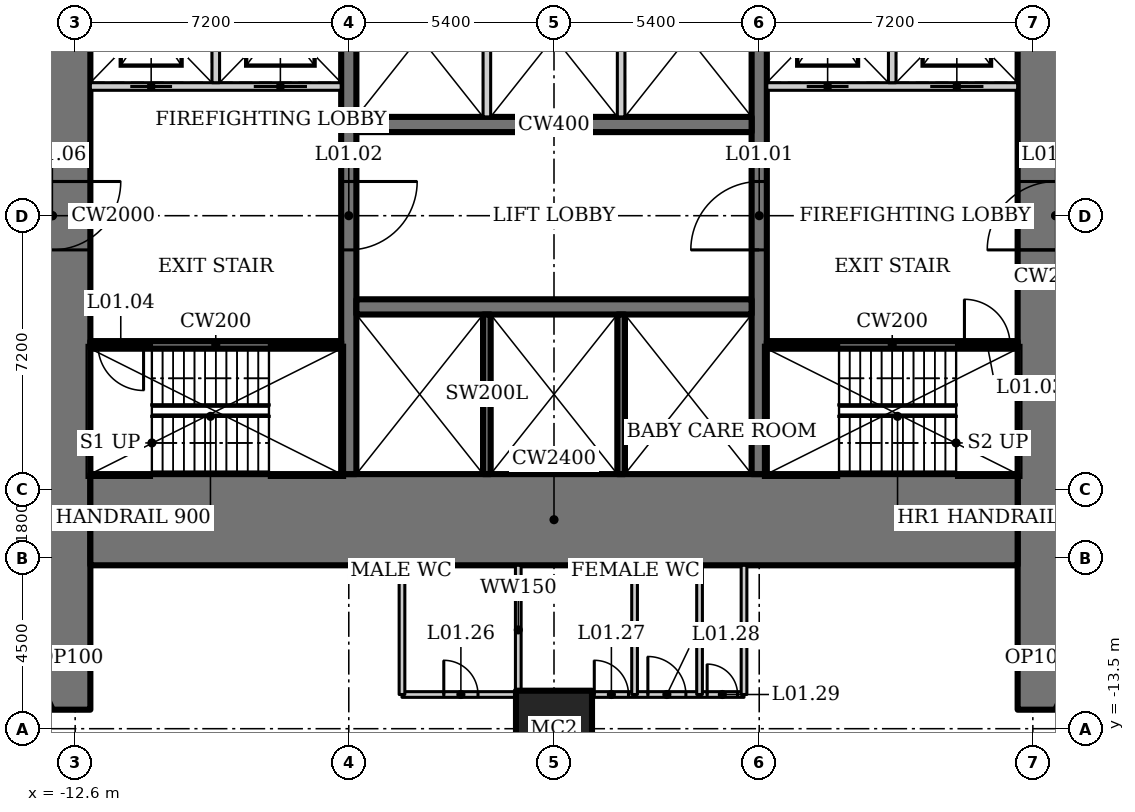
"""IFC4 building model, lengths in metres.
Left out: names, types, materials, properties, quantities, classifications, styles, units other than length and angle.
Written with IfcOpenShell. Run it as: python <this file> out.ifc"""

import sys

from ifc_helpers import new_model, si_unit, direction, frame, frame_2d, origin, origin_2d, place, context, subcontext, project, spatial, rectangle, hollow_rectangle, extrude, element, fill, save


model = new_model("IFC4")
c1 = context("Model", 3, precision=1e-05, world=origin(), true_north=direction((0.0, 1.0)))
c2 = subcontext(c1, "Body", "Model", "MODEL_VIEW")
j1 = project(units=[si_unit("LENGTHUNIT", "METRE"), si_unit("PLANEANGLEUNIT", "RADIAN")], contexts=[c1])
p1 = place(None, origin())
s1 = spatial("IfcSite", under=j1, at=p1, CompositionType="ELEMENT")
p2 = place(p1, origin())
s2 = spatial("IfcBuilding", under=s1, at=p2, CompositionType="ELEMENT")
p3 = place(p2, frame((0.0, 0.0, 6.5)))
s3 = spatial("IfcBuildingStorey", under=s2, at=p3, CompositionType="ELEMENT", Elevation=6.5)
p4 = place(p3, frame((0.0, -13.5, 0.0), z_axis=(0.0, 0.0, 1.0), x_axis=(1.0, 0.0, 0.0)))
e1 = element("IfcColumn", 1, at=p4, inside=s3, PredefinedType="COLUMN", context=c2, shape_type="SweptSolid", body=[
    extrude(hollow_rectangle(XDim=2.0, YDim=2.0, WallThickness=0.17, at=origin_2d()), origin(), (0.0, 0.0, 1.0), 8.0),
])
p5 = place(p3, frame((13.2, -13.0, 0.0), z_axis=(0.0, 0.0, 1.0), x_axis=(0.0, 1.0, 0.0)))
e2 = element("IfcWall", 2, at=p5, inside=s3, PredefinedType="SHEAR", context=c2, shape_type="SweptSolid", body=[
    extrude(rectangle(XDim=26.0, YDim=2.0, at=frame_2d((13.0, 0.0))), origin(), (0.0, 0.0, 1.0), 8.0),
])
p6 = place(p5, frame((12.1, 0.0, 0.0)))
e3 = element("IfcOpeningElement", 3, at=p6, cuts=e2, PredefinedType="OPENING", context=c2, shape_type="SweptSolid", body=[
    extrude(rectangle(XDim=1.8, YDim=2.1, at=frame_2d((0.9, 1.05))), frame((0.0, 1.01, 0.0), z_axis=(0.0, -1.0, 0.0), x_axis=(1.0, 0.0, 0.0)), (0.0, 0.0, 1.0), 2.02),
])
p7 = place(p3, frame((-13.2, 13.0, 0.0), z_axis=(0.0, 0.0, 1.0), x_axis=(0.0, -1.0, 0.0)))
e4 = element("IfcWall", 4, at=p7, inside=s3, PredefinedType="SHEAR", context=c2, shape_type="SweptSolid", body=[
    extrude(rectangle(XDim=26.0, YDim=2.0, at=frame_2d((13.0, 0.0))), origin(), (0.0, 0.0, 1.0), 8.0),
])
p8 = place(p7, frame((12.1, 0.0, 0.0)))
e5 = element("IfcOpeningElement", 5, at=p8, cuts=e4, PredefinedType="OPENING", context=c2, shape_type="SweptSolid", body=[
    extrude(rectangle(XDim=1.8, YDim=2.1, at=frame_2d((0.9, 1.05))), frame((0.0, 1.01, 0.0), z_axis=(0.0, -1.0, 0.0), x_axis=(1.0, 0.0, 0.0)), (0.0, 0.0, 1.0), 2.02),
])
p9 = place(p3, frame((-12.2, -8.0, 0.0), z_axis=(0.0, 0.0, 1.0), x_axis=(1.0, 0.0, 0.0)))
e6 = element("IfcWall", 6, at=p9, inside=s3, PredefinedType="SHEAR", context=c2, shape_type="SweptSolid", body=[
    extrude(rectangle(XDim=24.4, YDim=2.4, at=frame_2d((12.2, 0.0))), origin(), (0.0, 0.0, 1.0), 8.0),
])
p10 = place(p3, frame((5.4, -6.8, 0.0), z_axis=(0.0, 0.0, 1.0), x_axis=(0.0, 1.0, 0.0)))
e7 = element("IfcWall", 7, at=p10, inside=s3, PredefinedType="SHEAR", context=c2, shape_type="SweptSolid", body=[
    extrude(rectangle(XDim=13.6, YDim=0.4, at=frame_2d((6.8, 0.0))), origin(), (0.0, 0.0, 1.0), 8.0),
])
p11 = place(p10, frame((5.9, 0.0, 0.0)))
e8 = element("IfcOpeningElement", 8, at=p11, cuts=e7, PredefinedType="OPENING", context=c2, shape_type="SweptSolid", body=[
    extrude(rectangle(XDim=1.8, YDim=2.1, at=frame_2d((0.9, 1.05))), frame((0.0, 0.21, 0.0), z_axis=(0.0, -1.0, 0.0), x_axis=(1.0, 0.0, 0.0)), (0.0, 0.0, 1.0), 0.42),
])
p12 = place(p3, frame((-5.4, 6.8, 0.0), z_axis=(0.0, 0.0, 1.0), x_axis=(0.0, -1.0, 0.0)))
e9 = element("IfcWall", 9, at=p12, inside=s3, PredefinedType="SHEAR", context=c2, shape_type="SweptSolid", body=[
    extrude(rectangle(XDim=13.6, YDim=0.4, at=frame_2d((6.8, 0.0))), origin(), (0.0, 0.0, 1.0), 8.0),
])
p13 = place(p12, frame((5.9, 0.0, 0.0)))
e10 = element("IfcOpeningElement", 10, at=p13, cuts=e9, PredefinedType="OPENING", context=c2, shape_type="SweptSolid", body=[
    extrude(rectangle(XDim=1.8, YDim=2.1, at=frame_2d((0.9, 1.05))), frame((0.0, 0.21, 0.0), z_axis=(0.0, -1.0, 0.0), x_axis=(1.0, 0.0, 0.0)), (0.0, 0.0, 1.0), 0.42),
])
p14 = place(p3, frame((-5.2, -2.4, 0.0), z_axis=(0.0, 0.0, 1.0), x_axis=(1.0, 0.0, 0.0)))
e11 = element("IfcWall", 11, at=p14, inside=s3, PredefinedType="SHEAR", context=c2, shape_type="SweptSolid", body=[
    extrude(rectangle(XDim=10.4, YDim=0.4, at=frame_2d((5.2, 0.0))), origin(), (0.0, 0.0, 1.0), 8.0),
])
for number, where, z_axis, x_axis in (
    (12, (-1.767, -2.6, 0.0), (0.0, 0.0, 1.0), (0.0, -1.0, 0.0)),
    (13, (1.767, -2.6, 0.0), (0.0, 0.0, 1.0), (0.0, -1.0, 0.0)),
):
    element("IfcWall", number, at=place(p3, frame(where, z_axis=z_axis, x_axis=x_axis)), inside=s3, PredefinedType="SOLIDWALL", context=c2, shape_type="SweptSolid", body=[
        extrude(rectangle(XDim=4.2, YDim=0.2, at=frame_2d((2.1, 0.0))), origin(), (0.0, 0.0, 1.0), 8.0),
    ])
p15 = place(p3, frame((5.2, 2.4, 0.0), z_axis=(0.0, 0.0, 1.0), x_axis=(-1.0, 0.0, 0.0)))
e14 = element("IfcWall", 14, at=p15, inside=s3, PredefinedType="SHEAR", context=c2, shape_type="SweptSolid", body=[
    extrude(rectangle(XDim=10.4, YDim=0.4, at=frame_2d((5.2, 0.0))), origin(), (0.0, 0.0, 1.0), 8.0),
])
for number, where, z_axis, x_axis in (
    (15, (-1.767, 2.6, 0.0), (0.0, 0.0, 1.0), (0.0, 1.0, 0.0)),
    (16, (1.767, 2.6, 0.0), (0.0, 0.0, 1.0), (0.0, 1.0, 0.0)),
):
    element("IfcWall", number, at=place(p3, frame(where, z_axis=z_axis, x_axis=x_axis)), inside=s3, PredefinedType="SOLIDWALL", context=c2, shape_type="SweptSolid", body=[
        extrude(rectangle(XDim=4.2, YDim=0.2, at=frame_2d((2.1, 0.0))), origin(), (0.0, 0.0, 1.0), 8.0),
    ])
p16 = place(p3, frame((5.6, -3.4, 0.0), z_axis=(0.0, 0.0, 1.0), x_axis=(1.0, 0.0, 0.0)))
e17 = element("IfcWall", 17, at=p16, inside=s3, PredefinedType="SHEAR", context=c2, shape_type="SweptSolid", body=[
    extrude(rectangle(XDim=6.6, YDim=0.2, at=frame_2d((3.3, 0.0))), origin(), (0.0, 0.0, 1.0), 8.0),
])
p17 = place(p16, frame((5.2, 0.0, 0.0)))
e18 = element("IfcOpeningElement", 18, at=p17, cuts=e17, PredefinedType="OPENING", context=c2, shape_type="SweptSolid", body=[
    extrude(rectangle(XDim=1.2, YDim=2.1, at=frame_2d((0.6, 1.05))), frame((0.0, 0.11, 0.0), z_axis=(0.0, -1.0, 0.0), x_axis=(1.0, 0.0, 0.0)), (0.0, 0.0, 1.0), 0.22),
])
p18 = place(p3, frame((12.2, 3.4, 0.0), z_axis=(0.0, 0.0, 1.0), x_axis=(-1.0, 0.0, 0.0)))
e19 = element("IfcWall", 19, at=p18, inside=s3, PredefinedType="SOLIDWALL", context=c2, shape_type="SweptSolid", body=[
    extrude(rectangle(XDim=6.6, YDim=0.2, at=frame_2d((3.3, 0.0))), origin(), (0.0, 0.0, 1.0), 8.0),
])
p19 = place(p18, frame((4.45, 0.0, 0.0)))
e20 = element("IfcOpeningElement", 20, at=p19, cuts=e19, PredefinedType="OPENING", context=c2, shape_type="SweptSolid", body=[
    extrude(rectangle(XDim=1.1, YDim=2.2, at=frame_2d((0.55, 1.1))), frame((0.0, 0.11, 0.0), z_axis=(0.0, -1.0, 0.0), x_axis=(1.0, 0.0, 0.0)), (0.0, 0.0, 1.0), 0.22),
])
p20 = place(p18, frame((0.9, 0.0, 0.0)))
e21 = element("IfcOpeningElement", 21, at=p20, cuts=e19, PredefinedType="OPENING", context=c2, shape_type="SweptSolid", body=[
    extrude(rectangle(XDim=1.4, YDim=2.2, at=frame_2d((0.7, 1.1))), frame((0.0, 0.11, 0.0), z_axis=(0.0, -1.0, 0.0), x_axis=(1.0, 0.0, 0.0)), (0.0, 0.0, 1.0), 0.22),
])
p21 = place(p3, frame((8.9, 3.5, 0.0), z_axis=(0.0, 0.0, 1.0), x_axis=(0.0, 1.0, 0.0)))
e22 = element("IfcWall", 22, at=p21, inside=s3, PredefinedType="SOLIDWALL", context=c2, shape_type="SweptSolid", body=[
    extrude(rectangle(XDim=3.3, YDim=0.2, at=frame_2d((1.65, 0.0))), origin(), (0.0, 0.0, 1.0), 8.0),
])
p22 = place(p3, frame((-5.6, -3.4, 0.0), z_axis=(0.0, 0.0, 1.0), x_axis=(-1.0, 0.0, 0.0)))
e23 = element("IfcWall", 23, at=p22, inside=s3, PredefinedType="SHEAR", context=c2, shape_type="SweptSolid", body=[
    extrude(rectangle(XDim=6.6, YDim=0.2, at=frame_2d((3.3, 0.0))), origin(), (0.0, 0.0, 1.0), 8.0),
])
p23 = place(p22, frame((5.2, 0.0, 0.0)))
e24 = element("IfcOpeningElement", 24, at=p23, cuts=e23, PredefinedType="OPENING", context=c2, shape_type="SweptSolid", body=[
    extrude(rectangle(XDim=1.2, YDim=2.1, at=frame_2d((0.6, 1.05))), frame((0.0, 0.11, 0.0), z_axis=(0.0, -1.0, 0.0), x_axis=(1.0, 0.0, 0.0)), (0.0, 0.0, 1.0), 0.22),
])
p24 = place(p3, frame((-12.2, 3.4, 0.0), z_axis=(0.0, 0.0, 1.0), x_axis=(1.0, 0.0, 0.0)))
e25 = element("IfcWall", 25, at=p24, inside=s3, PredefinedType="SOLIDWALL", context=c2, shape_type="SweptSolid", body=[
    extrude(rectangle(XDim=6.6, YDim=0.2, at=frame_2d((3.3, 0.0))), origin(), (0.0, 0.0, 1.0), 8.0),
])
p25 = place(p24, frame((1.05, 0.0, 0.0)))
e26 = element("IfcOpeningElement", 26, at=p25, cuts=e25, PredefinedType="OPENING", context=c2, shape_type="SweptSolid", body=[
    extrude(rectangle(XDim=1.1, YDim=2.2, at=frame_2d((0.55, 1.1))), frame((0.0, 0.11, 0.0), z_axis=(0.0, -1.0, 0.0), x_axis=(1.0, 0.0, 0.0)), (0.0, 0.0, 1.0), 0.22),
])
p26 = place(p24, frame((4.3, 0.0, 0.0)))
e27 = element("IfcOpeningElement", 27, at=p26, cuts=e25, PredefinedType="OPENING", context=c2, shape_type="SweptSolid", body=[
    extrude(rectangle(XDim=1.4, YDim=2.2, at=frame_2d((0.7, 1.1))), frame((0.0, 0.11, 0.0), z_axis=(0.0, -1.0, 0.0), x_axis=(1.0, 0.0, 0.0)), (0.0, 0.0, 1.0), 0.22),
])
p27 = place(p3, frame((-8.9, 3.5, 0.0), z_axis=(0.0, 0.0, 1.0), x_axis=(0.0, 1.0, 0.0)))
e28 = element("IfcWall", 28, at=p27, inside=s3, PredefinedType="SOLIDWALL", context=c2, shape_type="SweptSolid", body=[
    extrude(rectangle(XDim=3.3, YDim=0.2, at=frame_2d((1.65, 0.0))), origin(), (0.0, 0.0, 1.0), 8.0),
])
p28 = place(p3, frame((-4.0, -12.6, 0.0), z_axis=(0.0, 0.0, 1.0), x_axis=(1.0, 0.0, 0.0)))
e29 = element("IfcWall", 29, at=p28, inside=s3, PredefinedType="SOLIDWALL", context=c2, shape_type="SweptSolid", body=[
    extrude(rectangle(XDim=9.0, YDim=0.15, at=frame_2d((4.5, 0.0))), origin(), (0.0, 0.0, 1.0), 7.8),
])
p29 = place(p28, frame((1.1, 0.0, 0.0)))
e30 = element("IfcOpeningElement", 30, at=p29, cuts=e29, PredefinedType="OPENING", context=c2, shape_type="SweptSolid", body=[
    extrude(rectangle(XDim=0.9, YDim=2.1, at=frame_2d((0.45, 1.05))), frame((0.0, 0.085, 0.0), z_axis=(0.0, -1.0, 0.0), x_axis=(1.0, 0.0, 0.0)), (0.0, 0.0, 1.0), 0.17),
])
p30 = place(p28, frame((5.06, 0.0, 0.0)))
e31 = element("IfcOpeningElement", 31, at=p30, cuts=e29, PredefinedType="OPENING", context=c2, shape_type="SweptSolid", body=[
    extrude(rectangle(XDim=0.9, YDim=2.1, at=frame_2d((0.45, 1.05))), frame((0.0, 0.085, 0.0), z_axis=(0.0, -1.0, 0.0), x_axis=(1.0, 0.0, 0.0)), (0.0, 0.0, 1.0), 0.17),
])
p31 = place(p28, frame((6.47, 0.0, 0.0)))
e32 = element("IfcOpeningElement", 32, at=p31, cuts=e29, PredefinedType="OPENING", context=c2, shape_type="SweptSolid", body=[
    extrude(rectangle(XDim=1.0, YDim=2.1, at=frame_2d((0.5, 1.05))), frame((0.0, 0.085, 0.0), z_axis=(0.0, -1.0, 0.0), x_axis=(1.0, 0.0, 0.0)), (0.0, 0.0, 1.0), 0.17),
])
p32 = place(p28, frame((8.03, 0.0, 0.0)))
e33 = element("IfcOpeningElement", 33, at=p32, cuts=e29, PredefinedType="OPENING", context=c2, shape_type="SweptSolid", body=[
    extrude(rectangle(XDim=0.8, YDim=2.1, at=frame_2d((0.4, 1.05))), frame((0.0, 0.085, 0.0), z_axis=(0.0, -1.0, 0.0), x_axis=(1.0, 0.0, 0.0)), (0.0, 0.0, 1.0), 0.17),
])
for number, where, z_axis, x_axis in (
    (34, (-4.0, -9.2, 0.0), (0.0, 0.0, 1.0), (0.0, -1.0, 0.0)),
    (35, (5.0, -9.2, 0.0), (0.0, 0.0, 1.0), (0.0, -1.0, 0.0)),
    (36, (-0.94, -9.2, 0.0), (0.0, 0.0, 1.0), (0.0, -1.0, 0.0)),
):
    element("IfcWall", number, at=place(p3, frame(where, z_axis=z_axis, x_axis=x_axis)), inside=s3, PredefinedType="SOLIDWALL", context=c2, shape_type="SweptSolid", body=[
        extrude(rectangle(XDim=3.4, YDim=0.15, at=frame_2d((1.7, 0.0))), origin(), (0.0, 0.0, 1.0), 7.8),
    ])
p33 = place(p3, frame((2.12, -9.2, 0.0), z_axis=(0.0, 0.0, 1.0), x_axis=(0.0, -1.0, 0.0)))
e37 = element("IfcWall", 37, at=p33, inside=s3, PredefinedType="SOLIDWALL", context=c2, shape_type="SweptSolid", body=[
    extrude(rectangle(XDim=3.4, YDim=0.15, at=frame_2d((1.7, 0.0))), origin(), (0.0, 0.0, 1.0), 7.03),
])
p34 = place(p3, frame((3.83, -9.2, 0.0), z_axis=(0.0, 0.0, 1.0), x_axis=(0.0, -1.0, 0.0)))
e38 = element("IfcWall", 38, at=p34, inside=s3, PredefinedType="SOLIDWALL", context=c2, shape_type="SweptSolid", body=[
    extrude(rectangle(XDim=3.4, YDim=0.15, at=frame_2d((1.7, 0.0))), origin(), (0.0, 0.0, 1.0), 7.8),
])
for number, where, z_axis, x_axis in (
    (39, (13.2, -13.0, 0.0), (0.0, 0.0, 1.0), (0.42, 0.907, 0.0)),
    (40, (-13.2, -13.0, 0.0), (0.0, 0.0, 1.0), (-0.42, 0.907, 0.0)),
):
    element("IfcWall", number, at=place(p3, frame(where, z_axis=z_axis, x_axis=x_axis)), inside=s3, PredefinedType="PARTITIONING", context=c2, shape_type="SweptSolid", body=[
        extrude(rectangle(XDim=2.975, YDim=0.1, at=frame_2d((1.488, 0.0))), origin(), (0.0, 0.0, 1.0), 7.8),
    ])
p35 = place(p11, origin())
e41 = element("IfcDoor", 41, at=p35, inside=s3, OperationType="DOUBLE_DOOR_DOUBLE_SWING", PredefinedType="DOOR", context=c2, shape_type="SweptSolid", body=[
    extrude(rectangle(XDim=1.8, YDim=2.1, at=frame_2d((0.9, 1.05))), frame((0.0, 0.025, 0.0), z_axis=(0.0, -1.0, 0.0), x_axis=(1.0, 0.0, 0.0)), (0.0, 0.0, 1.0), 0.05),
])
fill(e8, e41)
p36 = place(p13, origin())
e42 = element("IfcDoor", 42, at=p36, inside=s3, OperationType="DOUBLE_DOOR_DOUBLE_SWING", PredefinedType="DOOR", context=c2, shape_type="SweptSolid", body=[
    extrude(rectangle(XDim=1.8, YDim=2.1, at=frame_2d((0.9, 1.05))), frame((0.0, 0.025, 0.0), z_axis=(0.0, -1.0, 0.0), x_axis=(1.0, 0.0, 0.0)), (0.0, 0.0, 1.0), 0.05),
])
fill(e10, e42)
p37 = place(p17, origin())
e43 = element("IfcDoor", 43, at=p37, inside=s3, OperationType="SINGLE_SWING_RIGHT", PredefinedType="DOOR", context=c2, shape_type="SweptSolid", body=[
    extrude(rectangle(XDim=1.2, YDim=2.1, at=frame_2d((0.6, 1.05))), frame((0.0, 0.025, 0.0), z_axis=(0.0, -1.0, 0.0), x_axis=(1.0, 0.0, 0.0)), (0.0, 0.0, 1.0), 0.05),
])
fill(e18, e43)
p38 = place(p23, origin())
e44 = element("IfcDoor", 44, at=p38, inside=s3, OperationType="SINGLE_SWING_RIGHT", PredefinedType="DOOR", context=c2, shape_type="SweptSolid", body=[
    extrude(rectangle(XDim=1.2, YDim=2.1, at=frame_2d((0.6, 1.05))), frame((0.0, 0.025, 0.0), z_axis=(0.0, -1.0, 0.0), x_axis=(1.0, 0.0, 0.0)), (0.0, 0.0, 1.0), 0.05),
])
fill(e24, e44)
p39 = place(p6, origin())
e45 = element("IfcDoor", 45, at=p39, inside=s3, OperationType="DOUBLE_DOOR_DOUBLE_SWING", PredefinedType="DOOR", context=c2, shape_type="SweptSolid", body=[
    extrude(rectangle(XDim=1.8, YDim=2.1, at=frame_2d((0.9, 1.05))), frame((0.0, 0.025, 0.0), z_axis=(0.0, -1.0, 0.0), x_axis=(1.0, 0.0, 0.0)), (0.0, 0.0, 1.0), 0.05),
])
fill(e3, e45)
p40 = place(p8, origin())
e46 = element("IfcDoor", 46, at=p40, inside=s3, OperationType="DOUBLE_DOOR_DOUBLE_SWING", PredefinedType="DOOR", context=c2, shape_type="SweptSolid", body=[
    extrude(rectangle(XDim=1.8, YDim=2.1, at=frame_2d((0.9, 1.05))), frame((0.0, 0.025, 0.0), z_axis=(0.0, -1.0, 0.0), x_axis=(1.0, 0.0, 0.0)), (0.0, 0.0, 1.0), 0.05),
])
fill(e5, e46)
p41 = place(p25, origin())
e47 = element("IfcDoor", 47, at=p41, inside=s3, OperationType="DOUBLE_DOOR_SLIDING", PredefinedType="DOOR", context=c2, shape_type="SweptSolid", body=[
    extrude(rectangle(XDim=1.1, YDim=2.2, at=frame_2d((0.55, 1.1))), frame((0.0, 0.025, 0.0), z_axis=(0.0, -1.0, 0.0), x_axis=(1.0, 0.0, 0.0)), (0.0, 0.0, 1.0), 0.05),
])
fill(e26, e47)
p42 = place(p26, origin())
e48 = element("IfcDoor", 48, at=p42, inside=s3, OperationType="DOUBLE_DOOR_SLIDING", PredefinedType="DOOR", context=c2, shape_type="SweptSolid", body=[
    extrude(rectangle(XDim=1.4, YDim=2.2, at=frame_2d((0.7, 1.1))), frame((0.0, 0.025, 0.0), z_axis=(0.0, -1.0, 0.0), x_axis=(1.0, 0.0, 0.0)), (0.0, 0.0, 1.0), 0.05),
])
fill(e27, e48)
p43 = place(p19, origin())
e49 = element("IfcDoor", 49, at=p43, inside=s3, OperationType="DOUBLE_DOOR_SLIDING", PredefinedType="DOOR", context=c2, shape_type="SweptSolid", body=[
    extrude(rectangle(XDim=1.1, YDim=2.2, at=frame_2d((0.55, 1.1))), frame((0.0, 0.025, 0.0), z_axis=(0.0, -1.0, 0.0), x_axis=(1.0, 0.0, 0.0)), (0.0, 0.0, 1.0), 0.05),
])
fill(e20, e49)
p44 = place(p20, origin())
e50 = element("IfcDoor", 50, at=p44, inside=s3, OperationType="DOUBLE_DOOR_SLIDING", PredefinedType="DOOR", context=c2, shape_type="SweptSolid", body=[
    extrude(rectangle(XDim=1.4, YDim=2.2, at=frame_2d((0.7, 1.1))), frame((0.0, 0.025, 0.0), z_axis=(0.0, -1.0, 0.0), x_axis=(1.0, 0.0, 0.0)), (0.0, 0.0, 1.0), 0.05),
])
fill(e21, e50)
p45 = place(p29, origin())
e51 = element("IfcDoor", 51, at=p45, inside=s3, OperationType="SINGLE_SWING_LEFT", PredefinedType="DOOR", context=c2, shape_type="SweptSolid", body=[
    extrude(rectangle(XDim=0.9, YDim=2.1, at=frame_2d((0.45, 1.05))), frame((0.0, 0.025, 0.0), z_axis=(0.0, -1.0, 0.0), x_axis=(1.0, 0.0, 0.0)), (0.0, 0.0, 1.0), 0.05),
])
fill(e30, e51)
p46 = place(p30, origin())
e52 = element("IfcDoor", 52, at=p46, inside=s3, OperationType="SINGLE_SWING_LEFT", PredefinedType="DOOR", context=c2, shape_type="SweptSolid", body=[
    extrude(rectangle(XDim=0.9, YDim=2.1, at=frame_2d((0.45, 1.05))), frame((0.0, 0.025, 0.0), z_axis=(0.0, -1.0, 0.0), x_axis=(1.0, 0.0, 0.0)), (0.0, 0.0, 1.0), 0.05),
])
fill(e31, e52)
p47 = place(p31, origin())
e53 = element("IfcDoor", 53, at=p47, inside=s3, OperationType="SINGLE_SWING_LEFT", PredefinedType="DOOR", context=c2, shape_type="SweptSolid", body=[
    extrude(rectangle(XDim=1.0, YDim=2.1, at=frame_2d((0.5, 1.05))), frame((0.0, 0.025, 0.0), z_axis=(0.0, -1.0, 0.0), x_axis=(1.0, 0.0, 0.0)), (0.0, 0.0, 1.0), 0.05),
])
fill(e32, e53)
p48 = place(p32, origin())
e54 = element("IfcDoor", 54, at=p48, inside=s3, OperationType="SINGLE_SWING_LEFT", PredefinedType="DOOR", context=c2, shape_type="SweptSolid", body=[
    extrude(rectangle(XDim=0.8, YDim=2.1, at=frame_2d((0.4, 1.05))), frame((0.0, 0.025, 0.0), z_axis=(0.0, -1.0, 0.0), x_axis=(1.0, 0.0, 0.0)), (0.0, 0.0, 1.0), 0.05),
])
fill(e33, e54)
save(model, sys.argv[1])
